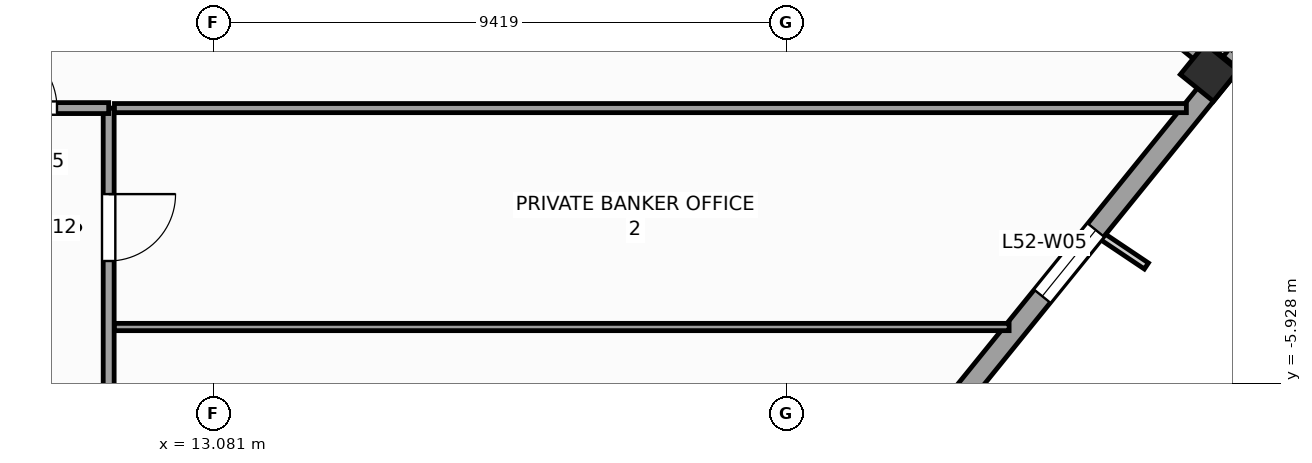
"""IFC4 building model, lengths in metres.
Left out: names, types, materials, properties, quantities, classifications, styles, units other than length and angle.
Written with IfcOpenShell. Run it as: python <this file> out.ifc"""

import sys

from ifc_helpers import new_model, si_unit, direction, frame, frame_2d, origin, origin_2d, place, context, subcontext, project, spatial, rectangle, extrude, source, transform, mapped, element, fill, save


model = new_model("IFC4")
c1 = context("Model", 3, precision=1e-05, world=origin(), true_north=direction((0.0, 1.0)))
c2 = subcontext(c1, "Body", "Model", "MODEL_VIEW")
j1 = project(units=[si_unit("LENGTHUNIT", "METRE"), si_unit("PLANEANGLEUNIT", "RADIAN")], contexts=[c1])
p1 = place(None, origin())
s1 = spatial("IfcSite", under=j1, at=p1, CompositionType="ELEMENT")
p2 = place(p1, origin())
s2 = spatial("IfcBuilding", under=s1, at=p2, CompositionType="ELEMENT")
p3 = place(p2, frame((0.0, 0.0, 217.3)))
s3 = spatial("IfcBuildingStorey", under=s2, at=p3, CompositionType="ELEMENT", Elevation=217.3)
m1 = source(origin(), c2, "Body", "SweptSolid", [
    extrude(rectangle(XDim=0.65, YDim=0.7, at=origin_2d()), origin(), (0.0, 0.0, 1.0), 3.9),
])
p4 = place(p3, frame((29.45, -0.815, 0.0), z_axis=(0.0, 0.0, 1.0), x_axis=(0.62932039105, 0.777145961457, 0.0)))
e1 = element("IfcColumn", 1, at=p4, inside=s3, PredefinedType="COLUMN", context=c2, shape_type="MappedRepresentation", body=[
    mapped(m1, transform((0.0, 0.0, 0.0), scale=1.0)),
])
p5 = place(p3, frame((6.733, -29.154, 0.0), z_axis=(0.0, 0.0, 1.0), x_axis=(0.629325378072, 0.77714192302, 0.0)))
e2 = element("IfcWall", 2, at=p5, inside=s3, PredefinedType="STANDARD", context=c2, shape_type="SweptSolid", body=[
    extrude(rectangle(XDim=36.84, YDim=0.34, at=frame_2d((18.42, 0.0))), origin(), (0.0, 0.0, 1.0), 2.96),
])
p6 = place(p5, frame((3.721, 0.0, 0.48)))
e3 = element("IfcOpeningElement", 3, at=p6, cuts=e2, PredefinedType="OPENING", context=c2, shape_type="SweptSolid", body=[
    extrude(rectangle(XDim=1.4, YDim=2.4, at=frame_2d((0.7, 1.2))), frame((0.0, 0.18, 0.0), z_axis=(0.0, -1.0, 0.0), x_axis=(1.0, 0.0, 0.0)), (0.0, 0.0, 1.0), 0.36),
])
p7 = place(p5, frame((10.559, 0.0, 0.58)))
e4 = element("IfcOpeningElement", 4, at=p7, cuts=e2, PredefinedType="OPENING", context=c2, shape_type="SweptSolid", body=[
    extrude(rectangle(XDim=1.75, YDim=2.3, at=frame_2d((0.875, 1.15))), frame((0.0, 0.18, 0.0), z_axis=(0.0, -1.0, 0.0), x_axis=(1.0, 0.0, 0.0)), (0.0, 0.0, 1.0), 0.36),
])
p8 = place(p5, frame((16.058, 0.0, 0.58)))
e5 = element("IfcOpeningElement", 5, at=p8, cuts=e2, PredefinedType="OPENING", context=c2, shape_type="SweptSolid", body=[
    extrude(rectangle(XDim=1.75, YDim=2.3, at=frame_2d((0.875, 1.15))), frame((0.0, 0.18, 0.0), z_axis=(0.0, -1.0, 0.0), x_axis=(1.0, 0.0, 0.0)), (0.0, 0.0, 1.0), 0.36),
])
p9 = place(p5, frame((24.176, 0.0, 0.58)))
e6 = element("IfcOpeningElement", 6, at=p9, cuts=e2, PredefinedType="OPENING", context=c2, shape_type="SweptSolid", body=[
    extrude(rectangle(XDim=1.75, YDim=2.3, at=frame_2d((0.875, 1.15))), frame((0.0, 0.18, 0.0), z_axis=(0.0, -1.0, 0.0), x_axis=(1.0, 0.0, 0.0)), (0.0, 0.0, 1.0), 0.36),
])
p10 = place(p5, frame((31.732, 0.0, 0.48)))
e7 = element("IfcOpeningElement", 7, at=p10, cuts=e2, PredefinedType="OPENING", context=c2, shape_type="SweptSolid", body=[
    extrude(rectangle(XDim=1.4, YDim=2.4, at=frame_2d((0.7, 1.2))), frame((0.0, 0.18, 0.0), z_axis=(0.0, -1.0, 0.0), x_axis=(1.0, 0.0, 0.0)), (0.0, 0.0, 1.0), 0.36),
])
p11 = place(p3, frame((29.703, -0.789, 0.0), z_axis=(0.0, 0.0, 1.0), x_axis=(-0.77714355312, 0.629323365087, 0.0)))
e8 = element("IfcWall", 8, at=p11, inside=s3, PredefinedType="STANDARD", context=c2, shape_type="SweptSolid", body=[
    extrude(rectangle(XDim=5.5, YDim=0.34, at=frame_2d((2.75, 0.0))), origin(), (0.0, 0.0, 1.0), 3.66),
])
p12 = place(p3, frame((11.35, -10.2, 0.0), z_axis=(0.0, 0.0, 1.0), x_axis=(0.0, 1.0, 0.0)))
e9 = element("IfcWall", 9, at=p12, inside=s3, PredefinedType="PARTITIONING", context=c2, shape_type="SweptSolid", body=[
    extrude(rectangle(XDim=8.8, YDim=0.18, at=frame_2d((4.4, 0.0))), origin(), (0.0, 0.0, 1.0), 3.66),
])
p13 = place(p12, frame((3.05, 0.0, 0.0)))
e10 = element("IfcOpeningElement", 10, at=p13, cuts=e9, PredefinedType="OPENING", context=c2, shape_type="SweptSolid", body=[
    extrude(rectangle(XDim=1.1, YDim=2.2, at=frame_2d((0.55, 1.1))), frame((0.0, 0.1, 0.0), z_axis=(0.0, -1.0, 0.0), x_axis=(1.0, 0.0, 0.0)), (0.0, 0.0, 1.0), 0.2),
])
p14 = place(p12, frame((6.286, 0.0, 0.0)))
e11 = element("IfcOpeningElement", 11, at=p14, cuts=e9, PredefinedType="OPENING", context=c2, shape_type="SweptSolid", body=[
    extrude(rectangle(XDim=1.1, YDim=2.2, at=frame_2d((0.55, 1.1))), frame((0.0, 0.1, 0.0), z_axis=(0.0, -1.0, 0.0), x_axis=(1.0, 0.0, 0.0)), (0.0, 0.0, 1.0), 0.2),
])
p15 = place(p3, frame((8.55, -1.4, 0.0), z_axis=(0.0, 0.0, 1.0), x_axis=(1.0, 0.0, 0.0)))
e12 = element("IfcWall", 12, at=p15, inside=s3, PredefinedType="PARTITIONING", context=c2, shape_type="SweptSolid", body=[
    extrude(rectangle(XDim=2.8, YDim=0.18, at=frame_2d((1.4, 0.0))), origin(), (0.0, 0.0, 1.0), 3.66),
])
p16 = place(p15, frame((0.85, 0.0, 0.0)))
e13 = element("IfcOpeningElement", 13, at=p16, cuts=e12, PredefinedType="OPENING", context=c2, shape_type="SweptSolid", body=[
    extrude(rectangle(XDim=1.1, YDim=2.2, at=frame_2d((0.55, 1.1))), frame((0.0, 0.1, 0.0), z_axis=(0.0, -1.0, 0.0), x_axis=(1.0, 0.0, 0.0)), (0.0, 0.0, 1.0), 0.2),
])
p17 = place(p3, frame((11.445, -1.4, 0.0), z_axis=(0.0, 0.0, 1.0), x_axis=(1.0, 0.0, 0.0)))
e14 = element("IfcWall", 14, at=p17, inside=s3, PredefinedType="PARTITIONING", context=c2, shape_type="SweptSolid", body=[
    extrude(rectangle(XDim=17.628, YDim=0.15, at=frame_2d((8.814, 0.0))), origin(), (0.0, 0.0, 1.0), 3.66),
])
p18 = place(p3, frame((11.445, -5.0, 0.0), z_axis=(0.0, 0.0, 1.0), x_axis=(1.0, 0.0, 0.0)))
e15 = element("IfcWall", 15, at=p18, inside=s3, PredefinedType="PARTITIONING", context=c2, shape_type="SweptSolid", body=[
    extrude(rectangle(XDim=14.713, YDim=0.12, at=frame_2d((7.356, 0.0))), origin(), (0.0, 0.0, 1.0), 3.66),
])
m2 = source(origin(), c2, "Body", "SweptSolid", [
    extrude(rectangle(XDim=1.4, YDim=2.4, at=frame_2d((0.7, 1.2))), frame((0.0, 0.03, 0.0), z_axis=(0.0, -1.0, 0.0), x_axis=(1.0, 0.0, 0.0)), (0.0, 0.0, 1.0), 0.06),
])
p19 = place(p10, origin())
e16 = element("IfcWindow", 16, at=p19, inside=s3, PartitioningType="SINGLE_PANEL", PredefinedType="WINDOW", context=c2, shape_type="MappedRepresentation", body=[
    mapped(m2, transform((0.0, 0.0, 0.0), scale=1.0)),
])
fill(e7, e16)
m3 = source(origin(), c2, "Body", "SweptSolid", [
    extrude(rectangle(XDim=1.1, YDim=2.2, at=frame_2d((0.55, 1.1))), frame((0.0, 0.025, 0.0), z_axis=(0.0, -1.0, 0.0), x_axis=(1.0, 0.0, 0.0)), (0.0, 0.0, 1.0), 0.05),
])
p20 = place(p16, origin())
e17 = element("IfcDoor", 17, at=p20, inside=s3, OperationType="SINGLE_SWING_LEFT", PredefinedType="DOOR", context=c2, shape_type="MappedRepresentation", body=[
    mapped(m3, transform((0.0, 0.0, 0.0), scale=1.0)),
])
fill(e13, e17)
p21 = place(p14, frame((1.1, 0.0, 0.0), z_axis=(0.0, 0.0, 1.0), x_axis=(-1.0, 0.0, 0.0)))
e18 = element("IfcDoor", 18, at=p21, inside=s3, OperationType="SINGLE_SWING_RIGHT", PredefinedType="DOOR", context=c2, shape_type="MappedRepresentation", body=[
    mapped(m3, transform((0.0, 0.0, 0.0), scale=1.0)),
])
fill(e11, e18)
save(model, sys.argv[1])
